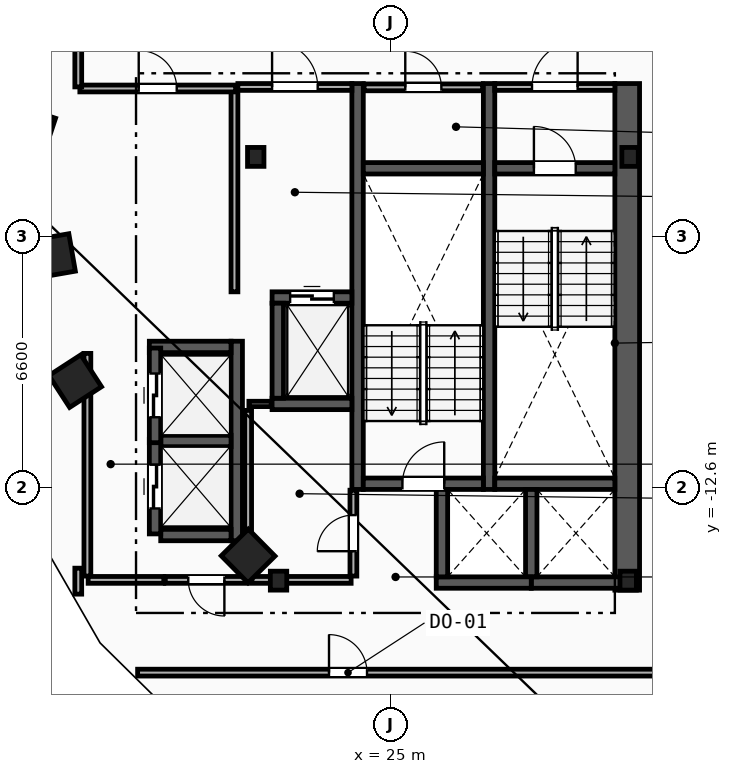
"""IFC4 building model, lengths in metres.
Left out: names, types, materials, properties, quantities, classifications, styles, units other than length and angle.
Written with IfcOpenShell. Run it as: python <this file> out.ifc"""

import sys

from ifc_helpers import new_model, si_unit, direction, frame, frame_2d, origin, origin_2d, place, context, subcontext, project, spatial, rectangle, i_section, extrude, element, fill, save


model = new_model("IFC4")
c1 = context("Model", 3, precision=1e-05, world=origin(), true_north=direction((0.0, 1.0)))
c2 = subcontext(c1, "Body", "Model", "MODEL_VIEW")
j1 = project(units=[si_unit("LENGTHUNIT", "METRE"), si_unit("PLANEANGLEUNIT", "RADIAN")], contexts=[c1])
p1 = place(None, origin())
s1 = spatial("IfcSite", under=j1, at=p1, CompositionType="ELEMENT")
p2 = place(p1, origin())
s2 = spatial("IfcBuilding", under=s1, at=p2, CompositionType="ELEMENT")
p3 = place(p2, frame((0.0, 0.0, 144.0)))
s3 = spatial("IfcBuildingStorey", under=s2, at=p3, CompositionType="ELEMENT", Elevation=144.0)
for number, where, z_axis, x_axis in (
    (1, (31.3, -3.9, 0.0), (0.0, 0.0, 1.0), (1.0, 0.0, 0.0)),
    (2, (21.45, -3.9, 0.0), (0.0, 0.0, 1.0), (1.0, 0.0, 0.0)),
    (3, (22.05, -15.05, 0.0), (0.0, 0.0, 1.0), (1.0, 0.0, 0.0)),
    (4, (31.25, -15.05, 0.0), (0.0, 0.0, 1.0), (1.0, 0.0, 0.0)),
):
    element("IfcColumn", number, at=place(p3, frame(where, z_axis=z_axis, x_axis=x_axis)), inside=s3, PredefinedType="COLUMN", context=c2, shape_type="SweptSolid", body=[
        extrude(i_section(OverallWidth=0.432, OverallDepth=0.498, WebThickness=0.056, FlangeThickness=0.089, FilletRadius=0.018, at=origin_2d()), origin(), (0.0, 0.0, 1.0), 3.6),
    ])
for number, where, z_axis, x_axis in (
    (5, (15.55, -3.2, 0.0), (0.0, 0.0, 1.0), (-0.315, -0.949, 0.0)),
    (6, (16.125, -6.5, 0.0), (0.0, 0.0, 1.0), (0.172, -0.985, 0.0)),
    (7, (16.7, -9.8, 0.0), (0.0, 0.0, 1.0), (0.544, -0.839, 0.0)),
    (8, (21.25, -14.4, 0.0), (0.0, 0.0, 1.0), (0.703, -0.711, 0.0)),
):
    element("IfcColumn", number, at=place(p3, frame(where, z_axis=z_axis, x_axis=x_axis)), inside=s3, PredefinedType="COLUMN", context=c2, shape_type="SweptSolid", body=[
        extrude(rectangle(XDim=1.0, YDim=1.0, at=origin_2d()), origin(), (0.0, 0.0, 1.0), 3.6),
    ])
p4 = place(p3, frame((31.225, -15.3, 0.0), z_axis=(0.0, 0.0, 1.0), x_axis=(0.0, 1.0, 0.0)))
e9 = element("IfcWall", 9, at=p4, inside=s3, PredefinedType="SHEAR", context=c2, shape_type="SweptSolid", body=[
    extrude(rectangle(XDim=13.33, YDim=0.65, at=frame_2d((6.665, 0.0))), origin(), (0.0, 0.0, 1.0), 3.36),
])
for number, where, z_axis, x_axis in (
    (10, (27.59, -12.65, 0.0), (0.0, 0.0, 1.0), (0.0, 1.0, 0.0)),
    (11, (24.13, -12.65, 0.0), (0.0, 0.0, 1.0), (0.0, 1.0, 0.0)),
):
    element("IfcWall", number, at=place(p3, frame(where, z_axis=z_axis, x_axis=x_axis)), inside=s3, PredefinedType="SHEAR", context=c2, shape_type="SweptSolid", body=[
        extrude(rectangle(XDim=10.68, YDim=0.3, at=frame_2d((5.34, 0.0))), origin(), (0.0, 0.0, 1.0), 3.36),
    ])
p5 = place(p3, frame((27.74, -4.2, 0.0), z_axis=(0.0, 0.0, 1.0), x_axis=(1.0, 0.0, 0.0)))
e12 = element("IfcWall", 12, at=p5, inside=s3, PredefinedType="SHEAR", context=c2, shape_type="SweptSolid", body=[
    extrude(rectangle(XDim=3.16, YDim=0.3, at=frame_2d((1.58, 0.0))), origin(), (0.0, 0.0, 1.0), 3.36),
])
p6 = place(p5, frame((1.03, 0.0, 0.0)))
e13 = element("IfcOpeningElement", 13, at=p6, cuts=e12, PredefinedType="OPENING", context=c2, shape_type="SweptSolid", body=[
    extrude(rectangle(XDim=1.1, YDim=2.15, at=frame_2d((0.55, 1.075))), frame((0.0, 0.16, 0.0), z_axis=(0.0, -1.0, 0.0), x_axis=(1.0, 0.0, 0.0)), (0.0, 0.0, 1.0), 0.32),
])
p7 = place(p3, frame((27.74, -12.5, 0.0), z_axis=(0.0, 0.0, 1.0), x_axis=(1.0, 0.0, 0.0)))
e14 = element("IfcWall", 14, at=p7, inside=s3, PredefinedType="SHEAR", context=c2, shape_type="SweptSolid", body=[
    extrude(rectangle(XDim=3.16, YDim=0.3, at=frame_2d((1.58, 0.0))), origin(), (0.0, 0.0, 1.0), 3.36),
])
p8 = place(p3, frame((24.28, -12.5, 0.0), z_axis=(0.0, 0.0, 1.0), x_axis=(1.0, 0.0, 0.0)))
e15 = element("IfcWall", 15, at=p8, inside=s3, PredefinedType="SHEAR", context=c2, shape_type="SweptSolid", body=[
    extrude(rectangle(XDim=3.16, YDim=0.3, at=frame_2d((1.58, 0.0))), origin(), (0.0, 0.0, 1.0), 3.36),
])
p9 = place(p8, frame((1.03, 0.0, 0.0)))
e16 = element("IfcOpeningElement", 16, at=p9, cuts=e15, PredefinedType="OPENING", context=c2, shape_type="SweptSolid", body=[
    extrude(rectangle(XDim=1.1, YDim=2.15, at=frame_2d((0.55, 1.075))), frame((0.0, 0.16, 0.0), z_axis=(0.0, -1.0, 0.0), x_axis=(1.0, 0.0, 0.0)), (0.0, 0.0, 1.0), 0.32),
])
p10 = place(p3, frame((24.28, -4.2, 0.0), z_axis=(0.0, 0.0, 1.0), x_axis=(1.0, 0.0, 0.0)))
e17 = element("IfcWall", 17, at=p10, inside=s3, PredefinedType="SHEAR", context=c2, shape_type="SweptSolid", body=[
    extrude(rectangle(XDim=3.16, YDim=0.3, at=frame_2d((1.58, 0.0))), origin(), (0.0, 0.0, 1.0), 3.36),
])
p11 = place(p3, frame((20.89, -7.45, 0.0), z_axis=(0.0, 0.0, 1.0), x_axis=(0.0, 1.0, 0.0)))
e18 = element("IfcWall", 18, at=p11, inside=s3, PredefinedType="PARTITIONING", context=c2, shape_type="SweptSolid", body=[
    extrude(rectangle(XDim=5.3, YDim=0.18, at=frame_2d((2.65, 0.0))), origin(), (0.0, 0.0, 1.0), 3.36),
])
p12 = place(p3, frame((20.98, -2.06, 0.0), z_axis=(0.0, 0.0, 1.0), x_axis=(1.0, 0.0, 0.0)))
e19 = element("IfcWall", 19, at=p12, inside=s3, PredefinedType="PARTITIONING", context=c2, shape_type="SweptSolid", body=[
    extrude(rectangle(XDim=3.0, YDim=0.18, at=frame_2d((1.5, 0.0))), origin(), (0.0, 0.0, 1.0), 3.36),
])
p13 = place(p12, frame((0.9, 0.0, 0.0)))
e20 = element("IfcOpeningElement", 20, at=p13, cuts=e19, PredefinedType="OPENING", context=c2, shape_type="SweptSolid", body=[
    extrude(rectangle(XDim=1.2, YDim=2.15, at=frame_2d((0.6, 1.075))), frame((0.0, 0.1, 0.0), z_axis=(0.0, -1.0, 0.0), x_axis=(1.0, 0.0, 0.0)), (0.0, 0.0, 1.0), 0.2),
])
p14 = place(p3, frame((27.74, -2.06, 0.0), z_axis=(0.0, 0.0, 1.0), x_axis=(1.0, 0.0, 0.0)))
e21 = element("IfcWall", 21, at=p14, inside=s3, PredefinedType="PARTITIONING", context=c2, shape_type="SweptSolid", body=[
    extrude(rectangle(XDim=3.16, YDim=0.18, at=frame_2d((1.58, 0.0))), origin(), (0.0, 0.0, 1.0), 3.36),
])
p15 = place(p14, frame((0.98, 0.0, 0.0)))
e22 = element("IfcOpeningElement", 22, at=p15, cuts=e21, PredefinedType="OPENING", context=c2, shape_type="SweptSolid", body=[
    extrude(rectangle(XDim=1.2, YDim=2.15, at=frame_2d((0.6, 1.075))), frame((0.0, 0.1, 0.0), z_axis=(0.0, -1.0, 0.0), x_axis=(1.0, 0.0, 0.0)), (0.0, 0.0, 1.0), 0.2),
])
p16 = place(p3, frame((21.88, -7.6, 0.0), z_axis=(0.0, 0.0, 1.0), x_axis=(1.0, 0.0, 0.0)))
e23 = element("IfcWall", 23, at=p16, inside=s3, PredefinedType="SHEAR", context=c2, shape_type="SweptSolid", body=[
    extrude(rectangle(XDim=2.1, YDim=0.3, at=frame_2d((1.05, 0.0))), origin(), (0.0, 0.0, 1.0), 3.36),
])
p17 = place(p16, frame((0.475, 0.0, 0.0)))
e24 = element("IfcOpeningElement", 24, at=p17, cuts=e23, PredefinedType="OPENING", context=c2, shape_type="SweptSolid", body=[
    extrude(rectangle(XDim=1.15, YDim=2.2, at=frame_2d((0.575, 1.1))), frame((0.0, 0.16, 0.0), z_axis=(0.0, -1.0, 0.0), x_axis=(1.0, 0.0, 0.0)), (0.0, 0.0, 1.0), 0.32),
])
p18 = place(p3, frame((21.88, -10.4, 0.0), z_axis=(0.0, 0.0, 1.0), x_axis=(1.0, 0.0, 0.0)))
e25 = element("IfcWall", 25, at=p18, inside=s3, PredefinedType="SHEAR", context=c2, shape_type="SweptSolid", body=[
    extrude(rectangle(XDim=2.1, YDim=0.3, at=frame_2d((1.05, 0.0))), origin(), (0.0, 0.0, 1.0), 3.36),
])
for number, where, z_axis, x_axis in (
    (26, (22.03, -10.25, 0.0), (0.0, 0.0, 1.0), (0.0, 1.0, 0.0)),
    (27, (28.7, -15.1, 0.0), (0.0, 0.0, 1.0), (1.0, 0.0, 0.0)),
):
    element("IfcWall", number, at=place(p3, frame(where, z_axis=z_axis, x_axis=x_axis)), inside=s3, PredefinedType="SHEAR", context=c2, shape_type="SweptSolid", body=[
        extrude(rectangle(XDim=2.5, YDim=0.3, at=frame_2d((1.25, 0.0))), origin(), (0.0, 0.0, 1.0), 3.36),
    ])
p19 = place(p3, frame((28.7, -14.95, 0.0), z_axis=(0.0, 0.0, 1.0), x_axis=(0.0, 1.0, 0.0)))
e28 = element("IfcWall", 28, at=p19, inside=s3, PredefinedType="SHEAR", context=c2, shape_type="SweptSolid", body=[
    extrude(rectangle(XDim=2.3, YDim=0.3, at=frame_2d((1.15, 0.0))), origin(), (0.0, 0.0, 1.0), 3.36),
])
p20 = place(p3, frame((26.2, -15.1, 0.0), z_axis=(0.0, 0.0, 1.0), x_axis=(1.0, 0.0, 0.0)))
e29 = element("IfcWall", 29, at=p20, inside=s3, PredefinedType="SHEAR", context=c2, shape_type="SweptSolid", body=[
    extrude(rectangle(XDim=2.5, YDim=0.3, at=frame_2d((1.25, 0.0))), origin(), (0.0, 0.0, 1.0), 3.36),
])
p21 = place(p3, frame((26.35, -14.95, 0.0), z_axis=(0.0, 0.0, 1.0), x_axis=(0.0, 1.0, 0.0)))
e30 = element("IfcWall", 30, at=p21, inside=s3, PredefinedType="SHEAR", context=c2, shape_type="SweptSolid", body=[
    extrude(rectangle(XDim=2.3, YDim=0.3, at=frame_2d((1.15, 0.0))), origin(), (0.0, 0.0, 1.0), 3.36),
])
p22 = place(p3, frame((20.95, -14.0, 0.0), z_axis=(0.0, 0.0, 1.0), x_axis=(0.0, 1.0, 0.0)))
e31 = element("IfcWall", 31, at=p22, inside=s3, PredefinedType="SHEAR", context=c2, shape_type="SweptSolid", body=[
    extrude(rectangle(XDim=5.25, YDim=0.3, at=frame_2d((2.625, 0.0))), origin(), (0.0, 0.0, 1.0), 3.36),
])
p23 = place(p3, frame((18.95, -13.85, 0.0), z_axis=(0.0, 0.0, 1.0), x_axis=(1.0, 0.0, 0.0)))
e32 = element("IfcWall", 32, at=p23, inside=s3, PredefinedType="SHEAR", context=c2, shape_type="SweptSolid", body=[
    extrude(rectangle(XDim=1.85, YDim=0.3, at=frame_2d((0.925, 0.0))), origin(), (0.0, 0.0, 1.0), 3.36),
])
p24 = place(p3, frame((18.65, -8.9, 0.0), z_axis=(0.0, 0.0, 1.0), x_axis=(1.0, 0.0, 0.0)))
e33 = element("IfcWall", 33, at=p24, inside=s3, PredefinedType="SHEAR", context=c2, shape_type="SweptSolid", body=[
    extrude(rectangle(XDim=2.15, YDim=0.3, at=frame_2d((1.075, 0.0))), origin(), (0.0, 0.0, 1.0), 3.36),
])
p25 = place(p3, frame((18.95, -11.375, 0.0), z_axis=(0.0, 0.0, 1.0), x_axis=(1.0, 0.0, 0.0)))
e34 = element("IfcWall", 34, at=p25, inside=s3, PredefinedType="SHEAR", context=c2, shape_type="SweptSolid", body=[
    extrude(rectangle(XDim=1.85, YDim=0.3, at=frame_2d((0.925, 0.0))), origin(), (0.0, 0.0, 1.0), 3.36),
])
p26 = place(p3, frame((18.8, -13.82, 0.0), z_axis=(0.0, 0.0, 1.0), x_axis=(0.0, 1.0, 0.0)))
e35 = element("IfcWall", 35, at=p26, inside=s3, PredefinedType="SHEAR", context=c2, shape_type="SweptSolid", body=[
    extrude(rectangle(XDim=2.49, YDim=0.3, at=frame_2d((1.245, 0.0))), origin(), (0.0, 0.0, 1.0), 3.36),
])
p27 = place(p26, frame((0.67, 0.0, 0.0)))
e36 = element("IfcOpeningElement", 36, at=p27, cuts=e35, PredefinedType="OPENING", context=c2, shape_type="SweptSolid", body=[
    extrude(rectangle(XDim=1.15, YDim=2.2, at=frame_2d((0.575, 1.1))), frame((0.0, 0.16, 0.0), z_axis=(0.0, -1.0, 0.0), x_axis=(1.0, 0.0, 0.0)), (0.0, 0.0, 1.0), 0.32),
])
p28 = place(p3, frame((18.8, -11.42, 0.0), z_axis=(0.0, 0.0, 1.0), x_axis=(0.0, 1.0, 0.0)))
e37 = element("IfcWall", 37, at=p28, inside=s3, PredefinedType="SHEAR", context=c2, shape_type="SweptSolid", body=[
    extrude(rectangle(XDim=2.49, YDim=0.3, at=frame_2d((1.245, 0.0))), origin(), (0.0, 0.0, 1.0), 3.36),
])
p29 = place(p28, frame((0.67, 0.0, 0.0)))
e38 = element("IfcOpeningElement", 38, at=p29, cuts=e37, PredefinedType="OPENING", context=c2, shape_type="SweptSolid", body=[
    extrude(rectangle(XDim=1.15, YDim=2.2, at=frame_2d((0.575, 1.1))), frame((0.0, 0.16, 0.0), z_axis=(0.0, -1.0, 0.0), x_axis=(1.0, 0.0, 0.0)), (0.0, 0.0, 1.0), 0.32),
])
p30 = place(p3, frame((17.02, -14.93, 0.0), z_axis=(0.0, 0.0, 1.0), x_axis=(0.0, 1.0, 0.0)))
e39 = element("IfcWall", 39, at=p30, inside=s3, PredefinedType="PARTITIONING", context=c2, shape_type="SweptSolid", body=[
    extrude(rectangle(XDim=5.86, YDim=0.18, at=frame_2d((2.93, 0.0))), origin(), (0.0, 0.0, 1.0), 3.36),
])
p31 = place(p3, frame((17.04, -15.03, 0.0), z_axis=(0.0, 0.0, 1.0), x_axis=(1.0, 0.0, 0.0)))
e40 = element("IfcWall", 40, at=p31, inside=s3, PredefinedType="PARTITIONING", context=c2, shape_type="SweptSolid", body=[
    extrude(rectangle(XDim=1.99, YDim=0.18, at=frame_2d((0.995, 0.0))), origin(), (0.0, 0.0, 1.0), 3.36),
])
p32 = place(p3, frame((21.23, -15.03, 0.0), z_axis=(0.0, 0.0, 1.0), x_axis=(-1.0, 0.0, 0.0)))
e41 = element("IfcWall", 41, at=p32, inside=s3, PredefinedType="PARTITIONING", context=c2, shape_type="SweptSolid", body=[
    extrude(rectangle(XDim=2.16, YDim=0.18, at=frame_2d((1.08, 0.0))), origin(), (0.0, 0.0, 1.0), 3.36),
])
p33 = place(p32, frame((0.605, 0.0, 0.0)))
e42 = element("IfcOpeningElement", 42, at=p33, cuts=e41, PredefinedType="OPENING", context=c2, shape_type="SweptSolid", body=[
    extrude(rectangle(XDim=0.95, YDim=2.1, at=frame_2d((0.475, 1.05))), frame((0.0, 0.1, 0.0), z_axis=(0.0, -1.0, 0.0), x_axis=(1.0, 0.0, 0.0)), (0.0, 0.0, 1.0), 0.2),
])
p34 = place(p3, frame((21.27, -10.4, 0.0), z_axis=(0.0, 0.0, 1.0), x_axis=(1.0, 0.0, 0.0)))
e43 = element("IfcWall", 43, at=p34, inside=s3, PredefinedType="PARTITIONING", context=c2, shape_type="SweptSolid", body=[
    extrude(rectangle(XDim=0.59, YDim=0.14, at=frame_2d((0.295, 0.0))), origin(), (0.0, 0.0, 1.0), 3.36),
])
p35 = place(p3, frame((21.25, -14.93, 0.0), z_axis=(0.0, 0.0, 1.0), x_axis=(0.0, 1.0, 0.0)))
e44 = element("IfcWall", 44, at=p35, inside=s3, PredefinedType="PARTITIONING", context=c2, shape_type="SweptSolid", body=[
    extrude(rectangle(XDim=4.36, YDim=0.18, at=frame_2d((2.18, 0.0))), origin(), (0.0, 0.0, 1.0), 3.36),
])
p36 = place(p3, frame((21.35, -15.03, 0.0), z_axis=(0.0, 0.0, 1.0), x_axis=(1.0, 0.0, 0.0)))
e45 = element("IfcWall", 45, at=p36, inside=s3, PredefinedType="PARTITIONING", context=c2, shape_type="SweptSolid", body=[
    extrude(rectangle(XDim=2.61, YDim=0.18, at=frame_2d((1.305, 0.0))), origin(), (0.0, 0.0, 1.0), 2.433),
])
p37 = place(p3, frame((24.3, -2.07, 0.0), z_axis=(0.0, 0.0, 1.0), x_axis=(1.0, 0.0, 0.0)))
e46 = element("IfcWall", 46, at=p37, inside=s3, PredefinedType="PARTITIONING", context=c2, shape_type="SweptSolid", body=[
    extrude(rectangle(XDim=3.12, YDim=0.18, at=frame_2d((1.56, 0.0))), origin(), (0.0, 0.0, 1.0), 3.36),
])
p38 = place(p37, frame((1.085, 0.0, 0.0)))
e47 = element("IfcOpeningElement", 47, at=p38, cuts=e46, PredefinedType="OPENING", context=c2, shape_type="SweptSolid", body=[
    extrude(rectangle(XDim=0.95, YDim=2.1, at=frame_2d((0.475, 1.05))), frame((0.0, 0.1, 0.0), z_axis=(0.0, -1.0, 0.0), x_axis=(1.0, 0.0, 0.0)), (0.0, 0.0, 1.0), 0.2),
])
p39 = place(p3, frame((24.02, -14.93, 0.0), z_axis=(0.0, 0.0, 1.0), x_axis=(0.0, 1.0, 0.0)))
e48 = element("IfcWall", 48, at=p39, inside=s3, PredefinedType="PARTITIONING", context=c2, shape_type="SweptSolid", body=[
    extrude(rectangle(XDim=2.26, YDim=0.18, at=frame_2d((1.13, 0.0))), origin(), (0.0, 0.0, 1.0), 3.36),
])
p40 = place(p39, frame((0.655, 0.0, 0.0)))
e49 = element("IfcOpeningElement", 49, at=p40, cuts=e48, PredefinedType="OPENING", context=c2, shape_type="SweptSolid", body=[
    extrude(rectangle(XDim=0.95, YDim=2.1, at=frame_2d((0.475, 1.05))), frame((0.0, 0.1, 0.0), z_axis=(0.0, -1.0, 0.0), x_axis=(1.0, 0.0, 0.0)), (0.0, 0.0, 1.0), 0.2),
])
p41 = place(p3, frame((18.342, -17.47, 0.0), z_axis=(0.0, 0.0, 1.0), x_axis=(1.0, 0.0, 0.0)))
e50 = element("IfcWall", 50, at=p41, inside=s3, PredefinedType="PARTITIONING", context=c2, shape_type="SweptSolid", body=[
    extrude(rectangle(XDim=15.287, YDim=0.18, at=frame_2d((7.643, 0.0))), origin(), (0.0, 0.0, 1.0), 3.36),
])
p42 = place(p41, frame((5.036, 0.0, 0.0)))
e51 = element("IfcOpeningElement", 51, at=p42, cuts=e50, PredefinedType="OPENING", context=c2, shape_type="SweptSolid", body=[
    extrude(rectangle(XDim=1.0, YDim=2.15, at=frame_2d((0.5, 1.075))), frame((0.0, 0.1, 0.0), z_axis=(0.0, -1.0, 0.0), x_axis=(1.0, 0.0, 0.0)), (0.0, 0.0, 1.0), 0.2),
])
p43 = place(p3, frame((16.822, -2.1, 0.0), z_axis=(0.0, 0.0, 1.0), x_axis=(1.0, 0.0, 0.0)))
e52 = element("IfcWall", 52, at=p43, inside=s3, PredefinedType="PARTITIONING", context=c2, shape_type="SweptSolid", body=[
    extrude(rectangle(XDim=4.098, YDim=0.18, at=frame_2d((2.049, 0.0))), origin(), (0.0, 0.0, 1.0), 3.36),
])
p44 = place(p43, frame((1.549, 0.0, 0.0)))
e53 = element("IfcOpeningElement", 53, at=p44, cuts=e52, PredefinedType="OPENING", context=c2, shape_type="SweptSolid", body=[
    extrude(rectangle(XDim=1.0, YDim=2.15, at=frame_2d((0.5, 1.075))), frame((0.0, 0.1, 0.0), z_axis=(0.0, -1.0, 0.0), x_axis=(1.0, 0.0, 0.0)), (0.0, 0.0, 1.0), 0.2),
])
p45 = place(p3, frame((16.78, 0.329, 0.0), z_axis=(0.0, 0.0, 1.0), x_axis=(0.0, -1.0, 0.0)))
e54 = element("IfcWall", 54, at=p45, inside=s3, PredefinedType="PARTITIONING", context=c2, shape_type="SweptSolid", body=[
    extrude(rectangle(XDim=2.387, YDim=0.18, at=frame_2d((1.194, 0.0))), origin(), (0.0, 0.0, 1.0), 3.36),
])
p46 = place(p3, frame((16.78, -14.721, 0.0), z_axis=(0.0, 0.0, 1.0), x_axis=(0.0, -1.0, 0.0)))
e55 = element("IfcWall", 55, at=p46, inside=s3, PredefinedType="PARTITIONING", context=c2, shape_type="SweptSolid", body=[
    extrude(rectangle(XDim=0.684, YDim=0.18, at=frame_2d((0.342, 0.0))), origin(), (0.0, 0.0, 1.0), 3.36),
])
p47 = place(p6, origin())
e56 = element("IfcDoor", 56, at=p47, inside=s3, OperationType="SINGLE_SWING_LEFT", PredefinedType="DOOR", context=c2, shape_type="SweptSolid", body=[
    extrude(rectangle(XDim=1.1, YDim=2.15, at=frame_2d((0.55, 1.075))), frame((0.0, 0.025, 0.0), z_axis=(0.0, -1.0, 0.0), x_axis=(1.0, 0.0, 0.0)), (0.0, 0.0, 1.0), 0.05),
])
fill(e13, e56)
p48 = place(p9, origin())
e57 = element("IfcDoor", 57, at=p48, inside=s3, OperationType="SINGLE_SWING_RIGHT", PredefinedType="DOOR", context=c2, shape_type="SweptSolid", body=[
    extrude(rectangle(XDim=1.1, YDim=2.15, at=frame_2d((0.55, 1.075))), frame((0.0, 0.025, 0.0), z_axis=(0.0, -1.0, 0.0), x_axis=(1.0, 0.0, 0.0)), (0.0, 0.0, 1.0), 0.05),
])
fill(e16, e57)
p49 = place(p13, origin())
e58 = element("IfcDoor", 58, at=p49, inside=s3, OperationType="SINGLE_SWING_LEFT", PredefinedType="DOOR", context=c2, shape_type="SweptSolid", body=[
    extrude(rectangle(XDim=1.2, YDim=2.15, at=frame_2d((0.6, 1.075))), frame((0.0, 0.025, 0.0), z_axis=(0.0, -1.0, 0.0), x_axis=(1.0, 0.0, 0.0)), (0.0, 0.0, 1.0), 0.05),
])
fill(e20, e58)
p50 = place(p15, origin())
e59 = element("IfcDoor", 59, at=p50, inside=s3, OperationType="SINGLE_SWING_RIGHT", PredefinedType="DOOR", context=c2, shape_type="SweptSolid", body=[
    extrude(rectangle(XDim=1.2, YDim=2.15, at=frame_2d((0.6, 1.075))), frame((0.0, 0.025, 0.0), z_axis=(0.0, -1.0, 0.0), x_axis=(1.0, 0.0, 0.0)), (0.0, 0.0, 1.0), 0.05),
])
fill(e22, e59)
p51 = place(p17, origin())
e60 = element("IfcDoor", 60, at=p51, inside=s3, OperationType="SLIDING_TO_LEFT", PredefinedType="TRAPDOOR", context=c2, shape_type="SweptSolid", body=[
    extrude(rectangle(XDim=1.15, YDim=2.2, at=frame_2d((0.575, 1.1))), frame((0.0, 0.025, 0.0), z_axis=(0.0, -1.0, 0.0), x_axis=(1.0, 0.0, 0.0)), (0.0, 0.0, 1.0), 0.05),
])
fill(e24, e60)
p52 = place(p27, origin())
e61 = element("IfcDoor", 61, at=p52, inside=s3, OperationType="SLIDING_TO_LEFT", PredefinedType="TRAPDOOR", context=c2, shape_type="SweptSolid", body=[
    extrude(rectangle(XDim=1.15, YDim=2.2, at=frame_2d((0.575, 1.1))), frame((0.0, 0.025, 0.0), z_axis=(0.0, -1.0, 0.0), x_axis=(1.0, 0.0, 0.0)), (0.0, 0.0, 1.0), 0.05),
])
fill(e36, e61)
p53 = place(p29, origin())
e62 = element("IfcDoor", 62, at=p53, inside=s3, OperationType="SLIDING_TO_LEFT", PredefinedType="TRAPDOOR", context=c2, shape_type="SweptSolid", body=[
    extrude(rectangle(XDim=1.15, YDim=2.2, at=frame_2d((0.575, 1.1))), frame((0.0, 0.025, 0.0), z_axis=(0.0, -1.0, 0.0), x_axis=(1.0, 0.0, 0.0)), (0.0, 0.0, 1.0), 0.05),
])
fill(e38, e62)
p54 = place(p42, origin())
e63 = element("IfcDoor", 63, at=p54, inside=s3, OperationType="SINGLE_SWING_LEFT", PredefinedType="DOOR", context=c2, shape_type="SweptSolid", body=[
    extrude(rectangle(XDim=1.0, YDim=2.15, at=frame_2d((0.5, 1.075))), frame((0.0, 0.025, 0.0), z_axis=(0.0, -1.0, 0.0), x_axis=(1.0, 0.0, 0.0)), (0.0, 0.0, 1.0), 0.05),
])
fill(e51, e63)
p55 = place(p44, origin())
e64 = element("IfcDoor", 64, at=p55, inside=s3, OperationType="SINGLE_SWING_LEFT", PredefinedType="DOOR", context=c2, shape_type="SweptSolid", body=[
    extrude(rectangle(XDim=1.0, YDim=2.15, at=frame_2d((0.5, 1.075))), frame((0.0, 0.025, 0.0), z_axis=(0.0, -1.0, 0.0), x_axis=(1.0, 0.0, 0.0)), (0.0, 0.0, 1.0), 0.05),
])
fill(e53, e64)
p56 = place(p38, origin())
e65 = element("IfcDoor", 65, at=p56, inside=s3, OperationType="SINGLE_SWING_LEFT", PredefinedType="DOOR", context=c2, shape_type="SweptSolid", body=[
    extrude(rectangle(XDim=0.95, YDim=2.1, at=frame_2d((0.475, 1.05))), frame((0.0, 0.025, 0.0), z_axis=(0.0, -1.0, 0.0), x_axis=(1.0, 0.0, 0.0)), (0.0, 0.0, 1.0), 0.05),
])
fill(e47, e65)
p57 = place(p40, origin())
e66 = element("IfcDoor", 66, at=p57, inside=s3, OperationType="SINGLE_SWING_LEFT", PredefinedType="DOOR", context=c2, shape_type="SweptSolid", body=[
    extrude(rectangle(XDim=0.95, YDim=2.1, at=frame_2d((0.475, 1.05))), frame((0.0, 0.025, 0.0), z_axis=(0.0, -1.0, 0.0), x_axis=(1.0, 0.0, 0.0)), (0.0, 0.0, 1.0), 0.05),
])
fill(e49, e66)
p58 = place(p33, origin())
e67 = element("IfcDoor", 67, at=p58, inside=s3, OperationType="SINGLE_SWING_LEFT", PredefinedType="DOOR", context=c2, shape_type="SweptSolid", body=[
    extrude(rectangle(XDim=0.95, YDim=2.1, at=frame_2d((0.475, 1.05))), frame((0.0, 0.025, 0.0), z_axis=(0.0, -1.0, 0.0), x_axis=(1.0, 0.0, 0.0)), (0.0, 0.0, 1.0), 0.05),
])
fill(e42, e67)
save(model, sys.argv[1])
